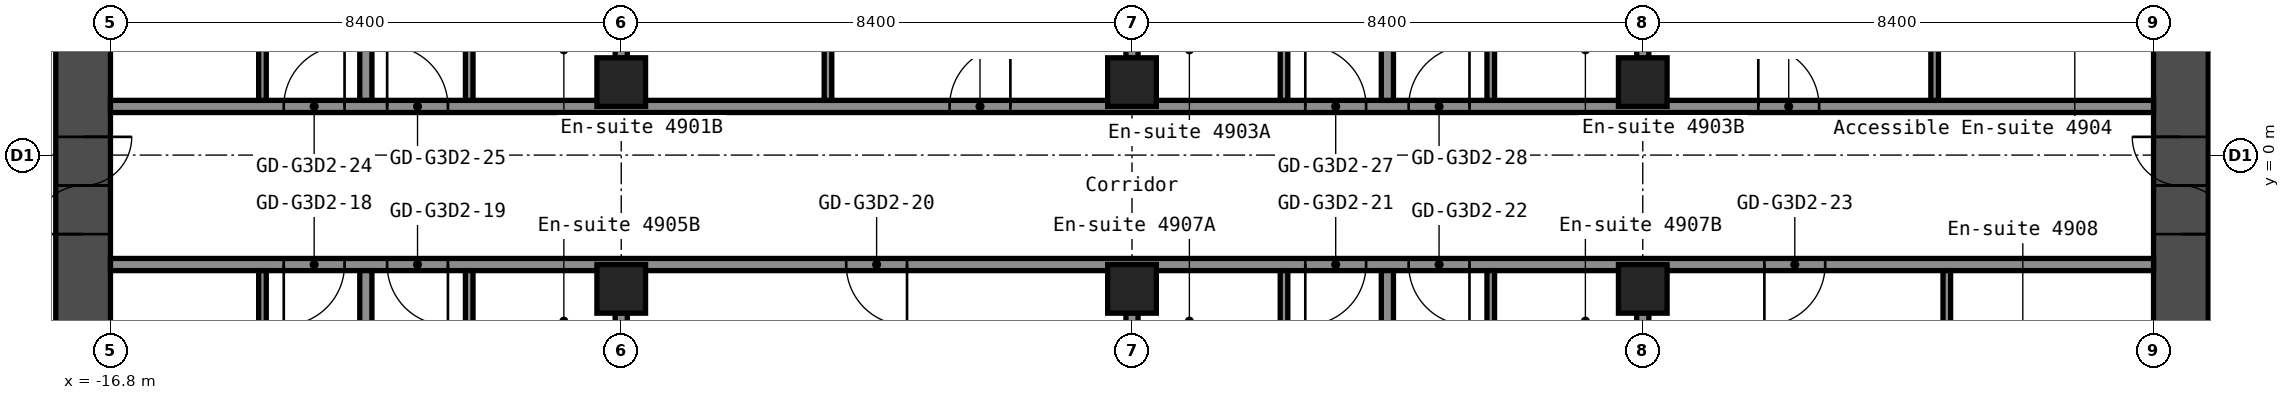
"""IFC4 building model, lengths in metres.
Left out: names, types, materials, properties, quantities, classifications, styles, units other than length and angle.
Written with IfcOpenShell. Run it as: python <this file> out.ifc"""

import sys

from ifc_helpers import new_model, si_unit, direction, frame, frame_2d, origin, origin_2d, place, context, subcontext, project, spatial, rectangle, hollow_rectangle, extrude, element, fill, save


model = new_model("IFC4")
c1 = context("Model", 3, precision=1e-05, world=origin(), true_north=direction((0.0, 1.0)))
c2 = subcontext(c1, "Body", "Model", "MODEL_VIEW")
j1 = project(units=[si_unit("LENGTHUNIT", "METRE"), si_unit("PLANEANGLEUNIT", "RADIAN")], contexts=[c1])
p1 = place(None, origin())
s1 = spatial("IfcSite", under=j1, at=p1, CompositionType="ELEMENT")
p2 = place(p1, origin())
s2 = spatial("IfcBuilding", under=s1, at=p2, CompositionType="ELEMENT")
p3 = place(p2, frame((0.0, 0.0, 172.6)))
s3 = spatial("IfcBuildingStorey", under=s2, at=p3, CompositionType="ELEMENT", Elevation=172.6)
for number, where, z_axis, x_axis in (
    (1, (-8.4, -2.2, 0.0), (0.0, 0.0, 1.0), (1.0, 0.0, 0.0)),
    (2, (-8.4, 1.2, 0.0), (0.0, 0.0, 1.0), (1.0, 0.0, 0.0)),
    (3, (0.0, -2.2, 0.0), (0.0, 0.0, 1.0), (1.0, 0.0, 0.0)),
    (4, (0.0, 1.2, 0.0), (0.0, 0.0, 1.0), (1.0, 0.0, 0.0)),
    (5, (8.4, -2.2, 0.0), (0.0, 0.0, 1.0), (1.0, 0.0, 0.0)),
    (6, (8.4, 1.2, 0.0), (0.0, 0.0, 1.0), (1.0, 0.0, 0.0)),
):
    element("IfcColumn", number, at=place(p3, frame(where, z_axis=z_axis, x_axis=x_axis)), inside=s3, PredefinedType="COLUMN", context=c2, shape_type="SweptSolid", body=[
        extrude(hollow_rectangle(XDim=0.8, YDim=0.8, WallThickness=0.032, at=origin_2d()), origin(), (0.0, 0.0, 1.0), 2.9),
    ])
p4 = place(p3, frame((-17.25, -8.4, 0.0), z_axis=(0.0, 0.0, 1.0), x_axis=(0.0, 1.0, 0.0)))
e7 = element("IfcWall", 7, at=p4, inside=s3, PredefinedType="SHEAR", context=c2, shape_type="SweptSolid", body=[
    extrude(rectangle(XDim=16.8, YDim=0.9, at=frame_2d((8.4, 0.0))), origin(), (0.0, 0.0, 1.0), 2.9),
])
p5 = place(p4, frame((7.1, 0.0, 0.0)))
e8 = element("IfcOpeningElement", 8, at=p5, cuts=e7, PredefinedType="OPENING", context=c2, shape_type="SweptSolid", body=[
    extrude(rectangle(XDim=1.6, YDim=2.1, at=frame_2d((0.8, 1.05))), frame((0.0, 0.46, 0.0), z_axis=(0.0, -1.0, 0.0), x_axis=(1.0, 0.0, 0.0)), (0.0, 0.0, 1.0), 0.92),
])
p6 = place(p3, frame((17.25, -8.4, 0.0), z_axis=(0.0, 0.0, 1.0), x_axis=(0.0, 1.0, 0.0)))
e9 = element("IfcWall", 9, at=p6, inside=s3, PredefinedType="SHEAR", context=c2, shape_type="SweptSolid", body=[
    extrude(rectangle(XDim=16.8, YDim=0.9, at=frame_2d((8.4, 0.0))), origin(), (0.0, 0.0, 1.0), 2.9),
])
p7 = place(p6, frame((7.1, 0.0, 0.0)))
e10 = element("IfcOpeningElement", 10, at=p7, cuts=e9, PredefinedType="OPENING", context=c2, shape_type="SweptSolid", body=[
    extrude(rectangle(XDim=1.6, YDim=2.1, at=frame_2d((0.8, 1.05))), frame((0.0, 0.46, 0.0), z_axis=(0.0, -1.0, 0.0), x_axis=(1.0, 0.0, 0.0)), (0.0, 0.0, 1.0), 0.92),
])
p8 = place(p3, frame((-16.8, -1.8, 0.0), z_axis=(0.0, 0.0, 1.0), x_axis=(1.0, 0.0, 0.0)))
e11 = element("IfcWall", 11, at=p8, inside=s3, PredefinedType="PARTITIONING", context=c2, shape_type="SweptSolid", body=[
    extrude(rectangle(XDim=33.6, YDim=0.2, at=frame_2d((16.8, 0.0))), origin(), (0.0, 0.0, 1.0), 2.9),
])
p9 = place(p8, frame((2.85, 0.0, 0.0)))
e12 = element("IfcOpeningElement", 12, at=p9, cuts=e11, PredefinedType="OPENING", context=c2, shape_type="SweptSolid", body=[
    extrude(rectangle(XDim=1.0, YDim=2.1, at=frame_2d((0.5, 1.05))), frame((0.0, 0.11, 0.0), z_axis=(0.0, -1.0, 0.0), x_axis=(1.0, 0.0, 0.0)), (0.0, 0.0, 1.0), 0.22),
])
p10 = place(p8, frame((4.55, 0.0, 0.0)))
e13 = element("IfcOpeningElement", 13, at=p10, cuts=e11, PredefinedType="OPENING", context=c2, shape_type="SweptSolid", body=[
    extrude(rectangle(XDim=1.0, YDim=2.1, at=frame_2d((0.5, 1.05))), frame((0.0, 0.11, 0.0), z_axis=(0.0, -1.0, 0.0), x_axis=(1.0, 0.0, 0.0)), (0.0, 0.0, 1.0), 0.22),
])
p11 = place(p8, frame((12.1, 0.0, 0.0)))
e14 = element("IfcOpeningElement", 14, at=p11, cuts=e11, PredefinedType="OPENING", context=c2, shape_type="SweptSolid", body=[
    extrude(rectangle(XDim=1.0, YDim=2.1, at=frame_2d((0.5, 1.05))), frame((0.0, 0.11, 0.0), z_axis=(0.0, -1.0, 0.0), x_axis=(1.0, 0.0, 0.0)), (0.0, 0.0, 1.0), 0.22),
])
p12 = place(p8, frame((19.65, 0.0, 0.0)))
e15 = element("IfcOpeningElement", 15, at=p12, cuts=e11, PredefinedType="OPENING", context=c2, shape_type="SweptSolid", body=[
    extrude(rectangle(XDim=1.0, YDim=2.1, at=frame_2d((0.5, 1.05))), frame((0.0, 0.11, 0.0), z_axis=(0.0, -1.0, 0.0), x_axis=(1.0, 0.0, 0.0)), (0.0, 0.0, 1.0), 0.22),
])
p13 = place(p8, frame((21.35, 0.0, 0.0)))
e16 = element("IfcOpeningElement", 16, at=p13, cuts=e11, PredefinedType="OPENING", context=c2, shape_type="SweptSolid", body=[
    extrude(rectangle(XDim=1.0, YDim=2.1, at=frame_2d((0.5, 1.05))), frame((0.0, 0.11, 0.0), z_axis=(0.0, -1.0, 0.0), x_axis=(1.0, 0.0, 0.0)), (0.0, 0.0, 1.0), 0.22),
])
p14 = place(p8, frame((27.2, 0.0, 0.0)))
e17 = element("IfcOpeningElement", 17, at=p14, cuts=e11, PredefinedType="OPENING", context=c2, shape_type="SweptSolid", body=[
    extrude(rectangle(XDim=1.0, YDim=2.1, at=frame_2d((0.5, 1.05))), frame((0.0, 0.11, 0.0), z_axis=(0.0, -1.0, 0.0), x_axis=(1.0, 0.0, 0.0)), (0.0, 0.0, 1.0), 0.22),
])
p15 = place(p3, frame((-16.8, 0.8, 0.0), z_axis=(0.0, 0.0, 1.0), x_axis=(1.0, 0.0, 0.0)))
e18 = element("IfcWall", 18, at=p15, inside=s3, PredefinedType="PARTITIONING", context=c2, shape_type="SweptSolid", body=[
    extrude(rectangle(XDim=33.6, YDim=0.2, at=frame_2d((16.8, 0.0))), origin(), (0.0, 0.0, 1.0), 2.9),
])
p16 = place(p15, frame((2.85, 0.0, 0.0)))
e19 = element("IfcOpeningElement", 19, at=p16, cuts=e18, PredefinedType="OPENING", context=c2, shape_type="SweptSolid", body=[
    extrude(rectangle(XDim=1.0, YDim=2.1, at=frame_2d((0.5, 1.05))), frame((0.0, 0.11, 0.0), z_axis=(0.0, -1.0, 0.0), x_axis=(1.0, 0.0, 0.0)), (0.0, 0.0, 1.0), 0.22),
])
p17 = place(p15, frame((4.55, 0.0, 0.0)))
e20 = element("IfcOpeningElement", 20, at=p17, cuts=e18, PredefinedType="OPENING", context=c2, shape_type="SweptSolid", body=[
    extrude(rectangle(XDim=1.0, YDim=2.1, at=frame_2d((0.5, 1.05))), frame((0.0, 0.11, 0.0), z_axis=(0.0, -1.0, 0.0), x_axis=(1.0, 0.0, 0.0)), (0.0, 0.0, 1.0), 0.22),
])
p18 = place(p15, frame((13.8, 0.0, 0.0)))
e21 = element("IfcOpeningElement", 21, at=p18, cuts=e18, PredefinedType="OPENING", context=c2, shape_type="SweptSolid", body=[
    extrude(rectangle(XDim=1.0, YDim=2.1, at=frame_2d((0.5, 1.05))), frame((0.0, 0.11, 0.0), z_axis=(0.0, -1.0, 0.0), x_axis=(1.0, 0.0, 0.0)), (0.0, 0.0, 1.0), 0.22),
])
p19 = place(p15, frame((19.65, 0.0, 0.0)))
e22 = element("IfcOpeningElement", 22, at=p19, cuts=e18, PredefinedType="OPENING", context=c2, shape_type="SweptSolid", body=[
    extrude(rectangle(XDim=1.0, YDim=2.1, at=frame_2d((0.5, 1.05))), frame((0.0, 0.11, 0.0), z_axis=(0.0, -1.0, 0.0), x_axis=(1.0, 0.0, 0.0)), (0.0, 0.0, 1.0), 0.22),
])
p20 = place(p15, frame((21.35, 0.0, 0.0)))
e23 = element("IfcOpeningElement", 23, at=p20, cuts=e18, PredefinedType="OPENING", context=c2, shape_type="SweptSolid", body=[
    extrude(rectangle(XDim=1.0, YDim=2.1, at=frame_2d((0.5, 1.05))), frame((0.0, 0.11, 0.0), z_axis=(0.0, -1.0, 0.0), x_axis=(1.0, 0.0, 0.0)), (0.0, 0.0, 1.0), 0.22),
])
p21 = place(p15, frame((27.1, 0.0, 0.0)))
e24 = element("IfcOpeningElement", 24, at=p21, cuts=e18, PredefinedType="OPENING", context=c2, shape_type="SweptSolid", body=[
    extrude(rectangle(XDim=1.0, YDim=2.1, at=frame_2d((0.5, 1.05))), frame((0.0, 0.11, 0.0), z_axis=(0.0, -1.0, 0.0), x_axis=(1.0, 0.0, 0.0)), (0.0, 0.0, 1.0), 0.22),
])
p22 = place(p3, frame((-14.3, -4.8, 0.0), z_axis=(0.0, 0.0, 1.0), x_axis=(0.0, 1.0, 0.0)))
e25 = element("IfcWall", 25, at=p22, inside=s3, PredefinedType="PARTITIONING", context=c2, shape_type="SweptSolid", body=[
    extrude(rectangle(XDim=2.9, YDim=0.125, at=frame_2d((1.45, 0.0))), origin(), (0.0, 0.0, 1.0), 2.9),
])
p23 = place(p22, frame((0.6, 0.0, 0.0)))
e26 = element("IfcOpeningElement", 26, at=p23, cuts=e25, PredefinedType="OPENING", context=c2, shape_type="SweptSolid", body=[
    extrude(rectangle(XDim=0.8, YDim=2.1, at=frame_2d((0.4, 1.05))), frame((0.0, 0.073, 0.0), z_axis=(0.0, -1.0, 0.0), x_axis=(1.0, 0.0, 0.0)), (0.0, 0.0, 1.0), 0.145),
])
p24 = place(p3, frame((-14.3, 0.9, 0.0), z_axis=(0.0, 0.0, 1.0), x_axis=(0.0, 1.0, 0.0)))
e27 = element("IfcWall", 27, at=p24, inside=s3, PredefinedType="PARTITIONING", context=c2, shape_type="SweptSolid", body=[
    extrude(rectangle(XDim=2.9, YDim=0.125, at=frame_2d((1.45, 0.0))), origin(), (0.0, 0.0, 1.0), 2.9),
])
p25 = place(p24, frame((1.5, 0.0, 0.0)))
e28 = element("IfcOpeningElement", 28, at=p25, cuts=e27, PredefinedType="OPENING", context=c2, shape_type="SweptSolid", body=[
    extrude(rectangle(XDim=0.8, YDim=2.1, at=frame_2d((0.4, 1.05))), frame((0.0, 0.073, 0.0), z_axis=(0.0, -1.0, 0.0), x_axis=(1.0, 0.0, 0.0)), (0.0, 0.0, 1.0), 0.145),
])
for number, where, z_axis, x_axis in (
    (29, (-12.6, -19.3, 0.0), (0.0, 0.0, 1.0), (0.0, 1.0, 0.0)),
    (30, (-12.6, 0.9, 0.0), (0.0, 0.0, 1.0), (0.0, 1.0, 0.0)),
):
    element("IfcWall", number, at=place(p3, frame(where, z_axis=z_axis, x_axis=x_axis)), inside=s3, PredefinedType="PARTITIONING", context=c2, shape_type="SweptSolid", body=[
        extrude(rectangle(XDim=17.4, YDim=0.2, at=frame_2d((8.7, 0.0))), origin(), (0.0, 0.0, 1.0), 2.9),
    ])
p26 = place(p3, frame((-10.9, -4.8, 0.0), z_axis=(0.0, 0.0, 1.0), x_axis=(0.0, 1.0, 0.0)))
e31 = element("IfcWall", 31, at=p26, inside=s3, PredefinedType="PARTITIONING", context=c2, shape_type="SweptSolid", body=[
    extrude(rectangle(XDim=2.9, YDim=0.125, at=frame_2d((1.45, 0.0))), origin(), (0.0, 0.0, 1.0), 2.9),
])
p27 = place(p26, frame((0.6, 0.0, 0.0)))
e32 = element("IfcOpeningElement", 32, at=p27, cuts=e31, PredefinedType="OPENING", context=c2, shape_type="SweptSolid", body=[
    extrude(rectangle(XDim=0.8, YDim=2.1, at=frame_2d((0.4, 1.05))), frame((0.0, 0.073, 0.0), z_axis=(0.0, -1.0, 0.0), x_axis=(1.0, 0.0, 0.0)), (0.0, 0.0, 1.0), 0.145),
])
p28 = place(p3, frame((-10.9, 0.9, 0.0), z_axis=(0.0, 0.0, 1.0), x_axis=(0.0, 1.0, 0.0)))
e33 = element("IfcWall", 33, at=p28, inside=s3, PredefinedType="PARTITIONING", context=c2, shape_type="SweptSolid", body=[
    extrude(rectangle(XDim=2.9, YDim=0.125, at=frame_2d((1.45, 0.0))), origin(), (0.0, 0.0, 1.0), 2.9),
])
p29 = place(p28, frame((1.5, 0.0, 0.0)))
e34 = element("IfcOpeningElement", 34, at=p29, cuts=e33, PredefinedType="OPENING", context=c2, shape_type="SweptSolid", body=[
    extrude(rectangle(XDim=0.8, YDim=2.1, at=frame_2d((0.4, 1.05))), frame((0.0, 0.073, 0.0), z_axis=(0.0, -1.0, 0.0), x_axis=(1.0, 0.0, 0.0)), (0.0, 0.0, 1.0), 0.145),
])
for number, where, z_axis, x_axis in (
    (35, (-8.4, -19.3, 0.0), (0.0, 0.0, 1.0), (0.0, 1.0, 0.0)),
    (36, (-8.4, 1.59, 0.0), (0.0, 0.0, 1.0), (0.0, 1.0, 0.0)),
):
    element("IfcWall", number, at=place(p3, frame(where, z_axis=z_axis, x_axis=x_axis)), inside=s3, PredefinedType="PARTITIONING", context=c2, shape_type="SweptSolid", body=[
        extrude(rectangle(XDim=16.71, YDim=0.2, at=frame_2d((8.355, 0.0))), origin(), (0.0, 0.0, 1.0), 2.9),
    ])
p30 = place(p3, frame((-5.0, 0.9, 0.0), z_axis=(0.0, 0.0, 1.0), x_axis=(0.0, 1.0, 0.0)))
e37 = element("IfcWall", 37, at=p30, inside=s3, PredefinedType="PARTITIONING", context=c2, shape_type="SweptSolid", body=[
    extrude(rectangle(XDim=3.3, YDim=0.125, at=frame_2d((1.65, 0.0))), origin(), (0.0, 0.0, 1.0), 2.9),
])
for number, where, z_axis, x_axis in (
    (38, (0.0, -19.3, 0.0), (0.0, 0.0, 1.0), (0.0, 1.0, 0.0)),
    (39, (0.0, 1.59, 0.0), (0.0, 0.0, 1.0), (0.0, 1.0, 0.0)),
):
    element("IfcWall", number, at=place(p3, frame(where, z_axis=z_axis, x_axis=x_axis)), inside=s3, PredefinedType="PARTITIONING", context=c2, shape_type="SweptSolid", body=[
        extrude(rectangle(XDim=16.71, YDim=0.2, at=frame_2d((8.355, 0.0))), origin(), (0.0, 0.0, 1.0), 2.9),
    ])
p31 = place(p3, frame((2.5, -4.8, 0.0), z_axis=(0.0, 0.0, 1.0), x_axis=(0.0, 1.0, 0.0)))
e40 = element("IfcWall", 40, at=p31, inside=s3, PredefinedType="PARTITIONING", context=c2, shape_type="SweptSolid", body=[
    extrude(rectangle(XDim=2.9, YDim=0.125, at=frame_2d((1.45, 0.0))), origin(), (0.0, 0.0, 1.0), 2.9),
])
p32 = place(p31, frame((0.6, 0.0, 0.0)))
e41 = element("IfcOpeningElement", 41, at=p32, cuts=e40, PredefinedType="OPENING", context=c2, shape_type="SweptSolid", body=[
    extrude(rectangle(XDim=0.8, YDim=2.1, at=frame_2d((0.4, 1.05))), frame((0.0, 0.073, 0.0), z_axis=(0.0, -1.0, 0.0), x_axis=(1.0, 0.0, 0.0)), (0.0, 0.0, 1.0), 0.145),
])
p33 = place(p3, frame((2.5, 0.9, 0.0), z_axis=(0.0, 0.0, 1.0), x_axis=(0.0, 1.0, 0.0)))
e42 = element("IfcWall", 42, at=p33, inside=s3, PredefinedType="PARTITIONING", context=c2, shape_type="SweptSolid", body=[
    extrude(rectangle(XDim=2.9, YDim=0.125, at=frame_2d((1.45, 0.0))), origin(), (0.0, 0.0, 1.0), 2.9),
])
p34 = place(p33, frame((1.5, 0.0, 0.0)))
e43 = element("IfcOpeningElement", 43, at=p34, cuts=e42, PredefinedType="OPENING", context=c2, shape_type="SweptSolid", body=[
    extrude(rectangle(XDim=0.8, YDim=2.1, at=frame_2d((0.4, 1.05))), frame((0.0, 0.073, 0.0), z_axis=(0.0, -1.0, 0.0), x_axis=(1.0, 0.0, 0.0)), (0.0, 0.0, 1.0), 0.145),
])
for number, where, z_axis, x_axis in (
    (44, (4.2, -19.3, 0.0), (0.0, 0.0, 1.0), (0.0, 1.0, 0.0)),
    (45, (4.2, 0.9, 0.0), (0.0, 0.0, 1.0), (0.0, 1.0, 0.0)),
):
    element("IfcWall", number, at=place(p3, frame(where, z_axis=z_axis, x_axis=x_axis)), inside=s3, PredefinedType="PARTITIONING", context=c2, shape_type="SweptSolid", body=[
        extrude(rectangle(XDim=17.4, YDim=0.2, at=frame_2d((8.7, 0.0))), origin(), (0.0, 0.0, 1.0), 2.9),
    ])
p35 = place(p3, frame((5.9, -4.8, 0.0), z_axis=(0.0, 0.0, 1.0), x_axis=(0.0, 1.0, 0.0)))
e46 = element("IfcWall", 46, at=p35, inside=s3, PredefinedType="PARTITIONING", context=c2, shape_type="SweptSolid", body=[
    extrude(rectangle(XDim=2.9, YDim=0.125, at=frame_2d((1.45, 0.0))), origin(), (0.0, 0.0, 1.0), 2.9),
])
p36 = place(p35, frame((0.6, 0.0, 0.0)))
e47 = element("IfcOpeningElement", 47, at=p36, cuts=e46, PredefinedType="OPENING", context=c2, shape_type="SweptSolid", body=[
    extrude(rectangle(XDim=0.8, YDim=2.1, at=frame_2d((0.4, 1.05))), frame((0.0, 0.073, 0.0), z_axis=(0.0, -1.0, 0.0), x_axis=(1.0, 0.0, 0.0)), (0.0, 0.0, 1.0), 0.145),
])
p37 = place(p3, frame((5.9, 0.9, 0.0), z_axis=(0.0, 0.0, 1.0), x_axis=(0.0, 1.0, 0.0)))
e48 = element("IfcWall", 48, at=p37, inside=s3, PredefinedType="PARTITIONING", context=c2, shape_type="SweptSolid", body=[
    extrude(rectangle(XDim=2.9, YDim=0.125, at=frame_2d((1.45, 0.0))), origin(), (0.0, 0.0, 1.0), 2.9),
])
p38 = place(p37, frame((1.5, 0.0, 0.0)))
e49 = element("IfcOpeningElement", 49, at=p38, cuts=e48, PredefinedType="OPENING", context=c2, shape_type="SweptSolid", body=[
    extrude(rectangle(XDim=0.8, YDim=2.1, at=frame_2d((0.4, 1.05))), frame((0.0, 0.073, 0.0), z_axis=(0.0, -1.0, 0.0), x_axis=(1.0, 0.0, 0.0)), (0.0, 0.0, 1.0), 0.145),
])
for number, where, z_axis, x_axis in (
    (50, (8.4, -19.3, 0.0), (0.0, 0.0, 1.0), (0.0, 1.0, 0.0)),
    (51, (8.4, 1.59, 0.0), (0.0, 0.0, 1.0), (0.0, 1.0, 0.0)),
):
    element("IfcWall", number, at=place(p3, frame(where, z_axis=z_axis, x_axis=x_axis)), inside=s3, PredefinedType="PARTITIONING", context=c2, shape_type="SweptSolid", body=[
        extrude(rectangle(XDim=16.71, YDim=0.2, at=frame_2d((8.355, 0.0))), origin(), (0.0, 0.0, 1.0), 2.9),
    ])
p39 = place(p3, frame((13.2, 0.9, 0.0), z_axis=(0.0, 0.0, 1.0), x_axis=(0.0, 1.0, 0.0)))
e52 = element("IfcWall", 52, at=p39, inside=s3, PredefinedType="PARTITIONING", context=c2, shape_type="SweptSolid", body=[
    extrude(rectangle(XDim=3.3, YDim=0.125, at=frame_2d((1.65, 0.0))), origin(), (0.0, 0.0, 1.0), 2.9),
])
p40 = place(p39, frame((1.1, 0.0, 0.0)))
e53 = element("IfcOpeningElement", 53, at=p40, cuts=e52, PredefinedType="OPENING", context=c2, shape_type="SweptSolid", body=[
    extrude(rectangle(XDim=1.0, YDim=2.1, at=frame_2d((0.5, 1.05))), frame((0.0, 0.073, 0.0), z_axis=(0.0, -1.0, 0.0), x_axis=(1.0, 0.0, 0.0)), (0.0, 0.0, 1.0), 0.145),
])
p41 = place(p3, frame((13.4, -5.2, 0.0), z_axis=(0.0, 0.0, 1.0), x_axis=(0.0, 1.0, 0.0)))
e54 = element("IfcWall", 54, at=p41, inside=s3, PredefinedType="PARTITIONING", context=c2, shape_type="SweptSolid", body=[
    extrude(rectangle(XDim=3.3, YDim=0.125, at=frame_2d((1.65, 0.0))), origin(), (0.0, 0.0, 1.0), 2.9),
])
p42 = place(p5, origin())
e55 = element("IfcDoor", 55, at=p42, inside=s3, OperationType="DOUBLE_DOOR_SINGLE_SWING", PredefinedType="DOOR", context=c2, shape_type="SweptSolid", body=[
    extrude(rectangle(XDim=1.6, YDim=2.1, at=frame_2d((0.8, 1.05))), frame((0.0, 0.025, 0.0), z_axis=(0.0, -1.0, 0.0), x_axis=(1.0, 0.0, 0.0)), (0.0, 0.0, 1.0), 0.05),
])
fill(e8, e55)
p43 = place(p7, origin())
e56 = element("IfcDoor", 56, at=p43, inside=s3, OperationType="DOUBLE_DOOR_SINGLE_SWING", PredefinedType="DOOR", context=c2, shape_type="SweptSolid", body=[
    extrude(rectangle(XDim=1.6, YDim=2.1, at=frame_2d((0.8, 1.05))), frame((0.0, 0.025, 0.0), z_axis=(0.0, -1.0, 0.0), x_axis=(1.0, 0.0, 0.0)), (0.0, 0.0, 1.0), 0.05),
])
fill(e10, e56)
p44 = place(p9, origin())
e57 = element("IfcDoor", 57, at=p44, inside=s3, OperationType="SINGLE_SWING_LEFT", PredefinedType="DOOR", context=c2, shape_type="SweptSolid", body=[
    extrude(rectangle(XDim=1.0, YDim=2.1, at=frame_2d((0.5, 1.05))), frame((0.0, 0.025, 0.0), z_axis=(0.0, -1.0, 0.0), x_axis=(1.0, 0.0, 0.0)), (0.0, 0.0, 1.0), 0.05),
])
fill(e12, e57)
p45 = place(p10, origin())
e58 = element("IfcDoor", 58, at=p45, inside=s3, OperationType="SINGLE_SWING_RIGHT", PredefinedType="DOOR", context=c2, shape_type="SweptSolid", body=[
    extrude(rectangle(XDim=1.0, YDim=2.1, at=frame_2d((0.5, 1.05))), frame((0.0, 0.025, 0.0), z_axis=(0.0, -1.0, 0.0), x_axis=(1.0, 0.0, 0.0)), (0.0, 0.0, 1.0), 0.05),
])
fill(e13, e58)
p46 = place(p11, origin())
e59 = element("IfcDoor", 59, at=p46, inside=s3, OperationType="SINGLE_SWING_RIGHT", PredefinedType="DOOR", context=c2, shape_type="SweptSolid", body=[
    extrude(rectangle(XDim=1.0, YDim=2.1, at=frame_2d((0.5, 1.05))), frame((0.0, 0.025, 0.0), z_axis=(0.0, -1.0, 0.0), x_axis=(1.0, 0.0, 0.0)), (0.0, 0.0, 1.0), 0.05),
])
fill(e14, e59)
p47 = place(p12, origin())
e60 = element("IfcDoor", 60, at=p47, inside=s3, OperationType="SINGLE_SWING_LEFT", PredefinedType="DOOR", context=c2, shape_type="SweptSolid", body=[
    extrude(rectangle(XDim=1.0, YDim=2.1, at=frame_2d((0.5, 1.05))), frame((0.0, 0.025, 0.0), z_axis=(0.0, -1.0, 0.0), x_axis=(1.0, 0.0, 0.0)), (0.0, 0.0, 1.0), 0.05),
])
fill(e15, e60)
p48 = place(p13, origin())
e61 = element("IfcDoor", 61, at=p48, inside=s3, OperationType="SINGLE_SWING_RIGHT", PredefinedType="DOOR", context=c2, shape_type="SweptSolid", body=[
    extrude(rectangle(XDim=1.0, YDim=2.1, at=frame_2d((0.5, 1.05))), frame((0.0, 0.025, 0.0), z_axis=(0.0, -1.0, 0.0), x_axis=(1.0, 0.0, 0.0)), (0.0, 0.0, 1.0), 0.05),
])
fill(e16, e61)
p49 = place(p14, origin())
e62 = element("IfcDoor", 62, at=p49, inside=s3, OperationType="SINGLE_SWING_LEFT", PredefinedType="DOOR", context=c2, shape_type="SweptSolid", body=[
    extrude(rectangle(XDim=1.0, YDim=2.1, at=frame_2d((0.5, 1.05))), frame((0.0, 0.025, 0.0), z_axis=(0.0, -1.0, 0.0), x_axis=(1.0, 0.0, 0.0)), (0.0, 0.0, 1.0), 0.05),
])
fill(e17, e62)
p50 = place(p16, origin())
e63 = element("IfcDoor", 63, at=p50, inside=s3, OperationType="SINGLE_SWING_LEFT", PredefinedType="DOOR", context=c2, shape_type="SweptSolid", body=[
    extrude(rectangle(XDim=1.0, YDim=2.1, at=frame_2d((0.5, 1.05))), frame((0.0, 0.025, 0.0), z_axis=(0.0, -1.0, 0.0), x_axis=(1.0, 0.0, 0.0)), (0.0, 0.0, 1.0), 0.05),
])
fill(e19, e63)
p51 = place(p17, origin())
e64 = element("IfcDoor", 64, at=p51, inside=s3, OperationType="SINGLE_SWING_RIGHT", PredefinedType="DOOR", context=c2, shape_type="SweptSolid", body=[
    extrude(rectangle(XDim=1.0, YDim=2.1, at=frame_2d((0.5, 1.05))), frame((0.0, 0.025, 0.0), z_axis=(0.0, -1.0, 0.0), x_axis=(1.0, 0.0, 0.0)), (0.0, 0.0, 1.0), 0.05),
])
fill(e20, e64)
p52 = place(p18, origin())
e65 = element("IfcDoor", 65, at=p52, inside=s3, OperationType="SINGLE_SWING_LEFT", PredefinedType="DOOR", context=c2, shape_type="SweptSolid", body=[
    extrude(rectangle(XDim=1.0, YDim=2.1, at=frame_2d((0.5, 1.05))), frame((0.0, 0.025, 0.0), z_axis=(0.0, -1.0, 0.0), x_axis=(1.0, 0.0, 0.0)), (0.0, 0.0, 1.0), 0.05),
])
fill(e21, e65)
p53 = place(p19, origin())
e66 = element("IfcDoor", 66, at=p53, inside=s3, OperationType="SINGLE_SWING_RIGHT", PredefinedType="DOOR", context=c2, shape_type="SweptSolid", body=[
    extrude(rectangle(XDim=1.0, YDim=2.1, at=frame_2d((0.5, 1.05))), frame((0.0, 0.025, 0.0), z_axis=(0.0, -1.0, 0.0), x_axis=(1.0, 0.0, 0.0)), (0.0, 0.0, 1.0), 0.05),
])
fill(e22, e66)
p54 = place(p20, origin())
e67 = element("IfcDoor", 67, at=p54, inside=s3, OperationType="SINGLE_SWING_LEFT", PredefinedType="DOOR", context=c2, shape_type="SweptSolid", body=[
    extrude(rectangle(XDim=1.0, YDim=2.1, at=frame_2d((0.5, 1.05))), frame((0.0, 0.025, 0.0), z_axis=(0.0, -1.0, 0.0), x_axis=(1.0, 0.0, 0.0)), (0.0, 0.0, 1.0), 0.05),
])
fill(e23, e67)
p55 = place(p21, origin())
e68 = element("IfcDoor", 68, at=p55, inside=s3, OperationType="SINGLE_SWING_RIGHT", PredefinedType="DOOR", context=c2, shape_type="SweptSolid", body=[
    extrude(rectangle(XDim=1.0, YDim=2.1, at=frame_2d((0.5, 1.05))), frame((0.0, 0.025, 0.0), z_axis=(0.0, -1.0, 0.0), x_axis=(1.0, 0.0, 0.0)), (0.0, 0.0, 1.0), 0.05),
])
fill(e24, e68)
save(model, sys.argv[1])
